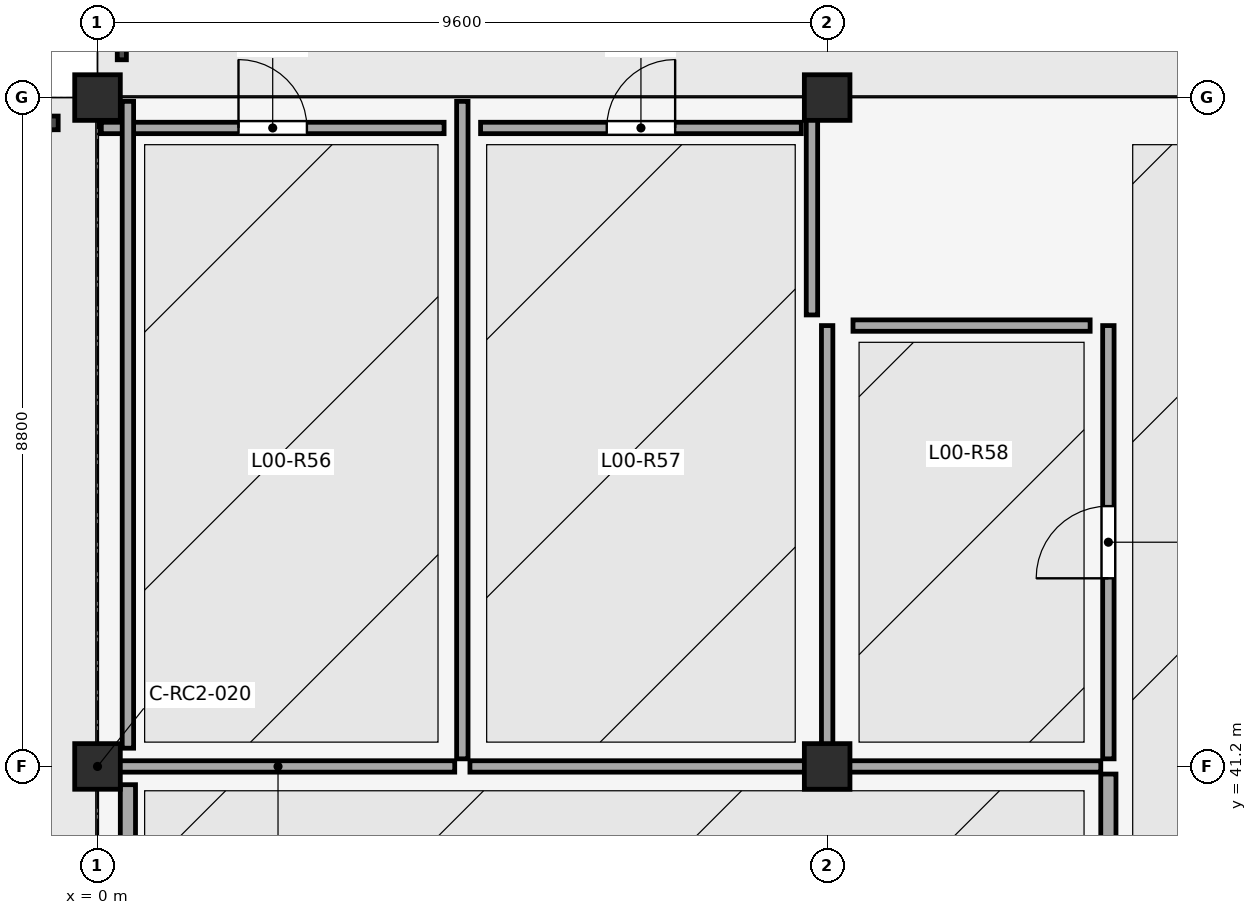
"""IFC4 building model, lengths in metres.
Left out: names, types, materials, properties, quantities, classifications, styles, units other than length and angle.
Written with IfcOpenShell. Run it as: python <this file> out.ifc"""

import sys

from ifc_helpers import new_model, si_unit, direction, frame, frame_2d, origin, origin_2d, place, context, subcontext, project, spatial, rectangle, extrude, element, fill, save


model = new_model("IFC4")
c1 = context("Model", 3, precision=1e-05, world=origin(), true_north=direction((0.0, 1.0)))
c2 = subcontext(c1, "Body", "Model", "MODEL_VIEW")
j1 = project(units=[si_unit("LENGTHUNIT", "METRE"), si_unit("PLANEANGLEUNIT", "RADIAN")], contexts=[c1])
p1 = place(None, origin())
s1 = spatial("IfcSite", under=j1, at=p1, CompositionType="ELEMENT")
p2 = place(p1, origin())
s2 = spatial("IfcBuilding", under=s1, at=p2, CompositionType="ELEMENT")
p3 = place(p2, origin())
s3 = spatial("IfcBuildingStorey", under=s2, at=p3, CompositionType="ELEMENT", Elevation=0.0)
for number, where, z_axis, x_axis in (
    (1, (0.0, 41.2, 0.0), (0.0, 0.0, 1.0), (1.0, 0.0, 0.0)),
    (2, (0.0, 50.0, 0.0), (0.0, 0.0, 1.0), (1.0, 0.0, 0.0)),
    (3, (9.6, 41.2, 0.0), (0.0, 0.0, 1.0), (1.0, 0.0, 0.0)),
    (4, (9.6, 50.0, 0.0), (0.0, 0.0, 1.0), (1.0, 0.0, 0.0)),
):
    element("IfcColumn", number, at=place(p3, frame(where, z_axis=z_axis, x_axis=x_axis)), inside=s3, PredefinedType="COLUMN", context=c2, shape_type="SweptSolid", body=[
        extrude(rectangle(XDim=0.6, YDim=0.6, at=origin_2d()), origin(), (0.0, 0.0, 1.0), 4.8),
    ])
p4 = place(p3, frame((13.3, 29.705, 0.0), z_axis=(0.0, 0.0, 1.0), x_axis=(0.0, 1.0, 0.0)))
e5 = element("IfcWall", 5, at=p4, inside=s3, PredefinedType="PARTITIONING", context=c2, shape_type="SweptSolid", body=[
    extrude(rectangle(XDim=11.395, YDim=0.2, at=frame_2d((5.698, 0.0))), origin(), (0.0, 0.0, 1.0), 4.42),
])
p5 = place(p4, frame((4.898, 0.0, 0.0)))
e6 = element("IfcOpeningElement", 6, at=p5, cuts=e5, PredefinedType="OPENING", context=c2, shape_type="SweptSolid", body=[
    extrude(rectangle(XDim=1.6, YDim=2.15, at=frame_2d((0.8, 1.075))), frame((0.0, 0.11, 0.0), z_axis=(0.0, -1.0, 0.0), x_axis=(1.0, 0.0, 0.0)), (0.0, 0.0, 1.0), 0.22),
])
p6 = place(p3, frame((0.05, 41.2, 0.0), z_axis=(0.0, 0.0, 1.0), x_axis=(1.0, 0.0, 0.0)))
e7 = element("IfcWall", 7, at=p6, inside=s3, PredefinedType="PARTITIONING", context=c2, shape_type="SweptSolid", body=[
    extrude(rectangle(XDim=4.65, YDim=0.15, at=frame_2d((2.325, 0.0))), origin(), (0.0, 0.0, 1.0), 3.895),
])
p7 = place(p3, frame((4.9, 41.2, 0.0), z_axis=(0.0, 0.0, 1.0), x_axis=(1.0, 0.0, 0.0)))
e8 = element("IfcWall", 8, at=p7, inside=s3, PredefinedType="PARTITIONING", context=c2, shape_type="SweptSolid", body=[
    extrude(rectangle(XDim=4.5, YDim=0.15, at=frame_2d((2.25, 0.0))), origin(), (0.0, 0.0, 1.0), 3.895),
])
p8 = place(p3, frame((9.8, 41.2, 0.0), z_axis=(0.0, 0.0, 1.0), x_axis=(1.0, 0.0, 0.0)))
e9 = element("IfcWall", 9, at=p8, inside=s3, PredefinedType="PARTITIONING", context=c2, shape_type="SweptSolid", body=[
    extrude(rectangle(XDim=3.4, YDim=0.15, at=frame_2d((1.7, 0.0))), origin(), (0.0, 0.0, 1.0), 3.895),
])
p9 = place(p3, frame((13.3, 41.3, 0.0), z_axis=(0.0, 0.0, 1.0), x_axis=(0.0, 1.0, 0.0)))
e10 = element("IfcWall", 10, at=p9, inside=s3, PredefinedType="PARTITIONING", context=c2, shape_type="SweptSolid", body=[
    extrude(rectangle(XDim=5.7, YDim=0.15, at=frame_2d((2.85, 0.0))), origin(), (0.0, 0.0, 1.0), 4.42),
])
p10 = place(p9, frame((2.375, 0.0, 0.0)))
e11 = element("IfcOpeningElement", 11, at=p10, cuts=e10, PredefinedType="OPENING", context=c2, shape_type="SweptSolid", body=[
    extrude(rectangle(XDim=0.95, YDim=2.15, at=frame_2d((0.475, 1.075))), frame((0.0, 0.085, 0.0), z_axis=(0.0, -1.0, 0.0), x_axis=(1.0, 0.0, 0.0)), (0.0, 0.0, 1.0), 0.17),
])
p11 = place(p3, frame((4.8, 41.3, 0.0), z_axis=(0.0, 0.0, 1.0), x_axis=(0.0, 1.0, 0.0)))
e12 = element("IfcWall", 12, at=p11, inside=s3, PredefinedType="PARTITIONING", context=c2, shape_type="SweptSolid", body=[
    extrude(rectangle(XDim=8.65, YDim=0.15, at=frame_2d((4.325, 0.0))), origin(), (0.0, 0.0, 1.0), 4.42),
])
p12 = place(p3, frame((9.6, 41.3, 0.0), z_axis=(0.0, 0.0, 1.0), x_axis=(0.0, 1.0, 0.0)))
e13 = element("IfcWall", 13, at=p12, inside=s3, PredefinedType="PARTITIONING", context=c2, shape_type="SweptSolid", body=[
    extrude(rectangle(XDim=5.7, YDim=0.15, at=frame_2d((2.85, 0.0))), origin(), (0.0, 0.0, 1.0), 4.037),
])
p13 = place(p3, frame((0.4, 28.64, 0.0), z_axis=(0.0, 0.0, 1.0), x_axis=(0.0, 1.0, 0.0)))
e14 = element("IfcWall", 14, at=p13, inside=s3, PredefinedType="PARTITIONING", context=c2, shape_type="SweptSolid", body=[
    extrude(rectangle(XDim=12.32, YDim=0.2, at=frame_2d((6.16, 0.0))), origin(), (0.0, 0.0, 1.0), 4.42),
])
p14 = place(p3, frame((0.05, 49.6, 0.0), z_axis=(0.0, 0.0, 1.0), x_axis=(1.0, 0.0, 0.0)))
e15 = element("IfcWall", 15, at=p14, inside=s3, PredefinedType="PARTITIONING", context=c2, shape_type="SweptSolid", body=[
    extrude(rectangle(XDim=4.51, YDim=0.15, at=frame_2d((2.255, 0.0))), origin(), (0.0, 0.0, 1.0), 4.42),
])
p15 = place(p14, frame((1.805, 0.0, 0.0)))
e16 = element("IfcOpeningElement", 16, at=p15, cuts=e15, PredefinedType="OPENING", context=c2, shape_type="SweptSolid", body=[
    extrude(rectangle(XDim=0.9, YDim=2.15, at=frame_2d((0.45, 1.075))), frame((0.0, 0.085, 0.0), z_axis=(0.0, -1.0, 0.0), x_axis=(1.0, 0.0, 0.0)), (0.0, 0.0, 1.0), 0.17),
])
p16 = place(p3, frame((0.4, 41.44, 0.0), z_axis=(0.0, 0.0, 1.0), x_axis=(0.0, 1.0, 0.0)))
e17 = element("IfcWall", 17, at=p16, inside=s3, PredefinedType="PARTITIONING", context=c2, shape_type="SweptSolid", body=[
    extrude(rectangle(XDim=8.51, YDim=0.15, at=frame_2d((4.255, 0.0))), origin(), (0.0, 0.0, 1.0), 4.42),
])
p17 = place(p3, frame((5.04, 49.6, 0.0), z_axis=(0.0, 0.0, 1.0), x_axis=(1.0, 0.0, 0.0)))
e18 = element("IfcWall", 18, at=p17, inside=s3, PredefinedType="PARTITIONING", context=c2, shape_type="SweptSolid", body=[
    extrude(rectangle(XDim=4.22, YDim=0.15, at=frame_2d((2.11, 0.0))), origin(), (0.0, 0.0, 1.0), 4.42),
])
p18 = place(p17, frame((1.66, 0.0, 0.0)))
e19 = element("IfcOpeningElement", 19, at=p18, cuts=e18, PredefinedType="OPENING", context=c2, shape_type="SweptSolid", body=[
    extrude(rectangle(XDim=0.9, YDim=2.15, at=frame_2d((0.45, 1.075))), frame((0.0, 0.085, 0.0), z_axis=(0.0, -1.0, 0.0), x_axis=(1.0, 0.0, 0.0)), (0.0, 0.0, 1.0), 0.17),
])
p19 = place(p3, frame((9.4, 47.14, 0.0), z_axis=(0.0, 0.0, 1.0), x_axis=(0.0, 1.0, 0.0)))
e20 = element("IfcWall", 20, at=p19, inside=s3, PredefinedType="PARTITIONING", context=c2, shape_type="SweptSolid", body=[
    extrude(rectangle(XDim=2.81, YDim=0.15, at=frame_2d((1.405, 0.0))), origin(), (0.0, 0.0, 1.0), 4.037),
])
p20 = place(p3, frame((9.94, 47.0, 0.0), z_axis=(0.0, 0.0, 1.0), x_axis=(1.0, 0.0, 0.0)))
e21 = element("IfcWall", 21, at=p20, inside=s3, PredefinedType="PARTITIONING", context=c2, shape_type="SweptSolid", body=[
    extrude(rectangle(XDim=3.12, YDim=0.15, at=frame_2d((1.56, 0.0))), origin(), (0.0, 0.0, 1.0), 4.1),
])
p21 = place(p10, origin())
e22 = element("IfcDoor", 22, at=p21, inside=s3, OperationType="SINGLE_SWING_LEFT", PredefinedType="DOOR", context=c2, shape_type="SweptSolid", body=[
    extrude(rectangle(XDim=0.95, YDim=2.15, at=frame_2d((0.475, 1.075))), frame((0.0, 0.025, 0.0), z_axis=(0.0, -1.0, 0.0), x_axis=(1.0, 0.0, 0.0)), (0.0, 0.0, 1.0), 0.05),
])
fill(e11, e22)
p22 = place(p15, origin())
e23 = element("IfcDoor", 23, at=p22, inside=s3, OperationType="SINGLE_SWING_LEFT", PredefinedType="DOOR", context=c2, shape_type="SweptSolid", body=[
    extrude(rectangle(XDim=0.9, YDim=2.15, at=frame_2d((0.45, 1.075))), frame((0.0, 0.025, 0.0), z_axis=(0.0, -1.0, 0.0), x_axis=(1.0, 0.0, 0.0)), (0.0, 0.0, 1.0), 0.05),
])
fill(e16, e23)
p23 = place(p18, origin())
e24 = element("IfcDoor", 24, at=p23, inside=s3, OperationType="SINGLE_SWING_RIGHT", PredefinedType="DOOR", context=c2, shape_type="SweptSolid", body=[
    extrude(rectangle(XDim=0.9, YDim=2.15, at=frame_2d((0.45, 1.075))), frame((0.0, 0.025, 0.0), z_axis=(0.0, -1.0, 0.0), x_axis=(1.0, 0.0, 0.0)), (0.0, 0.0, 1.0), 0.05),
])
fill(e19, e24)
save(model, sys.argv[1])
